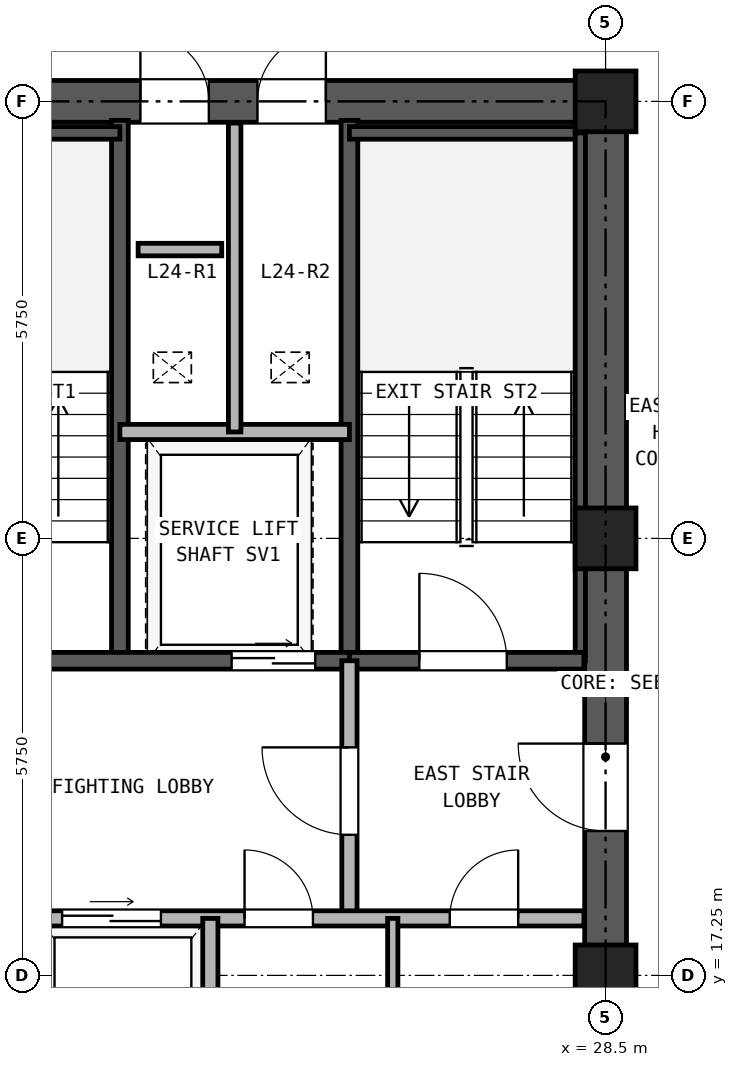
"""IFC4 building model, lengths in metres.
Left out: names, types, materials, properties, quantities, classifications, styles, units other than length and angle.
Written with IfcOpenShell. Run it as: python <this file> out.ifc"""

import sys

from ifc_helpers import new_model, si_unit, direction, frame, frame_2d, origin, origin_2d, place, context, subcontext, project, spatial, rectangle, hollow_rectangle, extrude, source, transform, mapped, element, fill, save


model = new_model("IFC4")
c1 = context("Model", 3, precision=1e-05, world=origin(), true_north=direction((0.0, 1.0)))
c2 = subcontext(c1, "Body", "Model", "MODEL_VIEW")
j1 = project(units=[si_unit("LENGTHUNIT", "METRE"), si_unit("PLANEANGLEUNIT", "RADIAN")], contexts=[c1])
p1 = place(None, origin())
s1 = spatial("IfcSite", under=j1, at=p1, CompositionType="ELEMENT")
p2 = place(p1, origin())
s2 = spatial("IfcBuilding", under=s1, at=p2, CompositionType="ELEMENT")
p3 = place(p2, frame((0.0, 0.0, 92.7)))
s3 = spatial("IfcBuildingStorey", under=s2, at=p3, CompositionType="ELEMENT", Elevation=92.7)
m1 = source(origin(), c2, "Body", "SweptSolid", [
    extrude(hollow_rectangle(XDim=0.8, YDim=0.8, WallThickness=0.045, at=origin_2d()), origin(), (0.0, 0.0, 1.0), 2.95),
])
for number, where, z_axis, x_axis in (
    (1, (28.5, 17.25, 0.0), (0.0, 0.0, 1.0), (1.0, 0.0, 0.0)),
    (2, (28.5, 23.0, 0.0), (0.0, 0.0, 1.0), (1.0, 0.0, 0.0)),
    (3, (28.5, 28.75, 0.0), (0.0, 0.0, 1.0), (1.0, 0.0, 0.0)),
):
    element("IfcColumn", number, at=place(p3, frame(where, z_axis=z_axis, x_axis=x_axis)), inside=s3, PredefinedType="COLUMN", context=c2, shape_type="MappedRepresentation", body=[
        mapped(m1, transform((0.0, 0.0, 0.0), x_axis=(1.0, 0.0, 0.0), y_axis=(0.0, 1.0, 0.0), z_axis=(0.0, 0.0, 1.0), scale=1.0)),
    ])
p4 = place(p3, frame((18.225, 28.75, 0.0), z_axis=(0.0, 0.0, 1.0), x_axis=(1.0, 0.0, 0.0)))
e4 = element("IfcWall", 4, at=p4, inside=s3, PredefinedType="SHEAR", context=c2, shape_type="SweptSolid", body=[
    extrude(rectangle(XDim=10.55, YDim=0.55, at=frame_2d((5.275, 0.0))), origin(), (0.0, 0.0, 1.0), 2.95),
])
p5 = place(p4, frame((4.155, 0.0, 0.0)))
e5 = element("IfcOpeningElement", 5, at=p5, cuts=e4, PredefinedType="OPENING", context=c2, shape_type="SweptSolid", body=[
    extrude(rectangle(XDim=0.9, YDim=2.05, at=frame_2d((0.45, 1.025))), frame((0.0, 0.285, 0.0), z_axis=(0.0, -1.0, 0.0), x_axis=(1.0, 0.0, 0.0)), (0.0, 0.0, 1.0), 0.57),
])
p6 = place(p4, frame((5.695, 0.0, 0.0)))
e6 = element("IfcOpeningElement", 6, at=p6, cuts=e4, PredefinedType="OPENING", context=c2, shape_type="SweptSolid", body=[
    extrude(rectangle(XDim=0.9, YDim=2.05, at=frame_2d((0.45, 1.025))), frame((0.0, 0.285, 0.0), z_axis=(0.0, -1.0, 0.0), x_axis=(1.0, 0.0, 0.0)), (0.0, 0.0, 1.0), 0.57),
])
p7 = place(p3, frame((28.5, 11.775, 0.0), z_axis=(0.0, 0.0, 1.0), x_axis=(0.0, 1.0, 0.0)))
e7 = element("IfcWall", 7, at=p7, inside=s3, PredefinedType="SHEAR", context=c2, shape_type="SweptSolid", body=[
    extrude(rectangle(XDim=16.7, YDim=0.55, at=frame_2d((8.35, 0.0))), origin(), (0.0, 0.0, 1.0), 2.95),
])
p8 = place(p7, frame((7.375, 0.0, 0.0)))
e8 = element("IfcOpeningElement", 8, at=p8, cuts=e7, PredefinedType="OPENING", context=c2, shape_type="SweptSolid", body=[
    extrude(rectangle(XDim=1.15, YDim=2.2, at=frame_2d((0.575, 1.1))), frame((0.0, 0.285, 0.0), z_axis=(0.0, -1.0, 0.0), x_axis=(1.0, 0.0, 0.0)), (0.0, 0.0, 1.0), 0.57),
])
for number, where, z_axis, x_axis in (
    (9, (22.11, 21.39, 0.0), (0.0, 0.0, 1.0), (0.0, 1.0, 0.0)),
    (10, (25.13, 21.39, 0.0), (0.0, 0.0, 1.0), (0.0, 1.0, 0.0)),
):
    element("IfcWall", number, at=place(p3, frame(where, z_axis=z_axis, x_axis=x_axis)), inside=s3, PredefinedType="SOLIDWALL", context=c2, shape_type="SweptSolid", body=[
        extrude(rectangle(XDim=7.11, YDim=0.22, at=frame_2d((3.555, 0.0))), origin(), (0.0, 0.0, 1.0), 2.95),
    ])
p9 = place(p3, frame((18.785, 28.335, 0.0), z_axis=(0.0, 0.0, 1.0), x_axis=(1.0, 0.0, 0.0)))
e11 = element("IfcWall", 11, at=p9, inside=s3, PredefinedType="PARTITIONING", context=c2, shape_type="SweptSolid", body=[
    extrude(rectangle(XDim=3.325, YDim=0.165, at=frame_2d((1.663, 0.0))), origin(), (0.0, 0.0, 1.0), 2.95),
])
p10 = place(p3, frame((25.13, 28.335, 0.0), z_axis=(0.0, 0.0, 1.0), x_axis=(1.0, 0.0, 0.0)))
e12 = element("IfcWall", 12, at=p10, inside=s3, PredefinedType="PARTITIONING", context=c2, shape_type="SweptSolid", body=[
    extrude(rectangle(XDim=3.085, YDim=0.165, at=frame_2d((1.542, 0.0))), origin(), (0.0, 0.0, 1.0), 2.95),
])
p11 = place(p3, frame((28.167, 21.39, 0.0), z_axis=(0.0, 0.0, 1.0), x_axis=(0.0, 1.0, 0.0)))
e13 = element("IfcWall", 13, at=p11, inside=s3, PredefinedType="PARTITIONING", context=c2, shape_type="SweptSolid", body=[
    extrude(rectangle(XDim=6.945, YDim=0.135, at=frame_2d((3.473, 0.0))), origin(), (0.0, 0.0, 1.0), 2.95),
])
p12 = place(p3, frame((18.785, 21.39, 0.0), z_axis=(0.0, 0.0, 1.0), x_axis=(1.0, 0.0, 0.0)))
e14 = element("IfcWall", 14, at=p12, inside=s3, PredefinedType="SOLIDWALL", context=c2, shape_type="SweptSolid", body=[
    extrude(rectangle(XDim=6.345, YDim=0.22, at=frame_2d((3.172, 0.0))), origin(), (0.0, 0.0, 1.0), 2.95),
])
p13 = place(p12, frame((1.065, 0.0, 0.0)))
e15 = element("IfcOpeningElement", 15, at=p13, cuts=e14, PredefinedType="OPENING", context=c2, shape_type="SweptSolid", body=[
    extrude(rectangle(XDim=1.15, YDim=2.2, at=frame_2d((0.575, 1.1))), frame((0.0, 0.12, 0.0), z_axis=(0.0, -1.0, 0.0), x_axis=(1.0, 0.0, 0.0)), (0.0, 0.0, 1.0), 0.24),
])
p14 = place(p12, frame((4.795, 0.0, 0.0)))
e16 = element("IfcOpeningElement", 16, at=p14, cuts=e14, PredefinedType="OPENING", context=c2, shape_type="SweptSolid", body=[
    extrude(rectangle(XDim=1.1, YDim=2.25, at=frame_2d((0.55, 1.125))), frame((0.0, 0.12, 0.0), z_axis=(0.0, -1.0, 0.0), x_axis=(1.0, 0.0, 0.0)), (0.0, 0.0, 1.0), 0.24),
])
p15 = place(p3, frame((25.13, 21.39, 0.0), z_axis=(0.0, 0.0, 1.0), x_axis=(1.0, 0.0, 0.0)))
e17 = element("IfcWall", 17, at=p15, inside=s3, PredefinedType="SOLIDWALL", context=c2, shape_type="SweptSolid", body=[
    extrude(rectangle(XDim=3.085, YDim=0.22, at=frame_2d((1.542, 0.0))), origin(), (0.0, 0.0, 1.0), 2.95),
])
p16 = place(p15, frame((0.92, 0.0, 0.0)))
e18 = element("IfcOpeningElement", 18, at=p16, cuts=e17, PredefinedType="OPENING", context=c2, shape_type="SweptSolid", body=[
    extrude(rectangle(XDim=1.15, YDim=2.2, at=frame_2d((0.575, 1.1))), frame((0.0, 0.12, 0.0), z_axis=(0.0, -1.0, 0.0), x_axis=(1.0, 0.0, 0.0)), (0.0, 0.0, 1.0), 0.24),
])
p17 = place(p3, frame((22.11, 24.4, 0.0), z_axis=(0.0, 0.0, 1.0), x_axis=(1.0, 0.0, 0.0)))
e19 = element("IfcWall", 19, at=p17, inside=s3, PredefinedType="PARTITIONING", context=c2, shape_type="SweptSolid", body=[
    extrude(rectangle(XDim=3.02, YDim=0.2, at=frame_2d((1.51, 0.0))), origin(), (0.0, 0.0, 1.0), 2.95),
])
p18 = place(p3, frame((23.62, 24.4, 0.0), z_axis=(0.0, 0.0, 1.0), x_axis=(0.0, 1.0, 0.0)))
e20 = element("IfcWall", 20, at=p18, inside=s3, PredefinedType="PARTITIONING", context=c2, shape_type="SweptSolid", body=[
    extrude(rectangle(XDim=4.065, YDim=0.165, at=frame_2d((2.033, 0.0))), origin(), (0.0, 0.0, 1.0), 2.95),
])
p19 = place(p3, frame((25.13, 18.0, 0.0), z_axis=(0.0, 0.0, 1.0), x_axis=(0.0, 1.0, 0.0)))
e21 = element("IfcWall", 21, at=p19, inside=s3, PredefinedType="PARTITIONING", context=c2, shape_type="SweptSolid", body=[
    extrude(rectangle(XDim=3.39, YDim=0.2, at=frame_2d((1.695, 0.0))), origin(), (0.0, 0.0, 1.0), 2.95),
])
p20 = place(p19, frame((1.1, 0.0, 0.0)))
e22 = element("IfcOpeningElement", 22, at=p20, cuts=e21, PredefinedType="OPENING", context=c2, shape_type="SweptSolid", body=[
    extrude(rectangle(XDim=1.15, YDim=2.2, at=frame_2d((0.575, 1.1))), frame((0.0, 0.11, 0.0), z_axis=(0.0, -1.0, 0.0), x_axis=(1.0, 0.0, 0.0)), (0.0, 0.0, 1.0), 0.22),
])
p21 = place(p3, frame((18.785, 18.0, 0.0), z_axis=(0.0, 0.0, 1.0), x_axis=(1.0, 0.0, 0.0)))
e23 = element("IfcWall", 23, at=p21, inside=s3, PredefinedType="PARTITIONING", context=c2, shape_type="SweptSolid", body=[
    extrude(rectangle(XDim=9.43, YDim=0.2, at=frame_2d((4.715, 0.0))), origin(), (0.0, 0.0, 1.0), 2.95),
])
p22 = place(p21, frame((0.465, 0.0, 0.0)))
e24 = element("IfcOpeningElement", 24, at=p22, cuts=e23, PredefinedType="OPENING", context=c2, shape_type="SweptSolid", body=[
    extrude(rectangle(XDim=1.3, YDim=2.3, at=frame_2d((0.65, 1.15))), frame((0.0, 0.11, 0.0), z_axis=(0.0, -1.0, 0.0), x_axis=(1.0, 0.0, 0.0)), (0.0, 0.0, 1.0), 0.22),
])
p23 = place(p21, frame((2.565, 0.0, 0.0)))
e25 = element("IfcOpeningElement", 25, at=p23, cuts=e23, PredefinedType="OPENING", context=c2, shape_type="SweptSolid", body=[
    extrude(rectangle(XDim=1.3, YDim=2.3, at=frame_2d((0.65, 1.15))), frame((0.0, 0.11, 0.0), z_axis=(0.0, -1.0, 0.0), x_axis=(1.0, 0.0, 0.0)), (0.0, 0.0, 1.0), 0.22),
])
p24 = place(p21, frame((4.965, 0.0, 0.0)))
e26 = element("IfcOpeningElement", 26, at=p24, cuts=e23, PredefinedType="OPENING", context=c2, shape_type="SweptSolid", body=[
    extrude(rectangle(XDim=0.9, YDim=2.05, at=frame_2d((0.45, 1.025))), frame((0.0, 0.11, 0.0), z_axis=(0.0, -1.0, 0.0), x_axis=(1.0, 0.0, 0.0)), (0.0, 0.0, 1.0), 0.22),
])
p25 = place(p21, frame((7.665, 0.0, 0.0)))
e27 = element("IfcOpeningElement", 27, at=p25, cuts=e23, PredefinedType="OPENING", context=c2, shape_type="SweptSolid", body=[
    extrude(rectangle(XDim=0.9, YDim=2.05, at=frame_2d((0.45, 1.025))), frame((0.0, 0.11, 0.0), z_axis=(0.0, -1.0, 0.0), x_axis=(1.0, 0.0, 0.0)), (0.0, 0.0, 1.0), 0.22),
])
p26 = place(p3, frame((23.3, 15.0, 0.0), z_axis=(0.0, 0.0, 1.0), x_axis=(0.0, 1.0, 0.0)))
e28 = element("IfcWall", 28, at=p26, inside=s3, PredefinedType="PARTITIONING", context=c2, shape_type="SweptSolid", body=[
    extrude(rectangle(XDim=3.0, YDim=0.2, at=frame_2d((1.5, 0.0))), origin(), (0.0, 0.0, 1.0), 2.95),
])
p27 = place(p3, frame((25.7, 15.0, 0.0), z_axis=(0.0, 0.0, 1.0), x_axis=(0.0, 1.0, 0.0)))
e29 = element("IfcWall", 29, at=p27, inside=s3, PredefinedType="PARTITIONING", context=c2, shape_type="SweptSolid", body=[
    extrude(rectangle(XDim=3.0, YDim=0.135, at=frame_2d((1.5, 0.0))), origin(), (0.0, 0.0, 1.0), 2.95),
])
p28 = place(p3, frame((22.35, 26.8, 0.0), z_axis=(0.0, 0.0, 1.0), x_axis=(1.0, 0.0, 0.0)))
e30 = element("IfcWall", 30, at=p28, inside=s3, PredefinedType="PARTITIONING", context=c2, shape_type="SweptSolid", body=[
    extrude(rectangle(XDim=1.1, YDim=0.165, at=frame_2d((0.55, 0.0))), origin(), (0.0, 0.0, 1.0), 2.95),
])
p29 = place(p16, frame((1.15, 0.0, 0.0), z_axis=(0.0, 0.0, 1.0), x_axis=(-1.0, 0.0, 0.0)))
e31 = element("IfcDoor", 31, at=p29, inside=s3, OperationType="SINGLE_SWING_LEFT", PredefinedType="DOOR", context=c2, shape_type="SweptSolid", body=[
    extrude(rectangle(XDim=1.15, YDim=2.2, at=frame_2d((0.575, 1.1))), frame((0.0, 0.025, 0.0), z_axis=(0.0, -1.0, 0.0), x_axis=(1.0, 0.0, 0.0)), (0.0, 0.0, 1.0), 0.05),
])
fill(e18, e31)
p30 = place(p14, frame((1.1, 0.0, 0.0), z_axis=(0.0, 0.0, 1.0), x_axis=(-1.0, 0.0, 0.0)))
e32 = element("IfcDoor", 32, at=p30, inside=s3, OperationType="DOUBLE_DOOR_SLIDING", PredefinedType="DOOR", context=c2, shape_type="SweptSolid", body=[
    extrude(rectangle(XDim=1.1, YDim=2.25, at=frame_2d((0.55, 1.125))), frame((0.0, 0.025, 0.0), z_axis=(0.0, -1.0, 0.0), x_axis=(1.0, 0.0, 0.0)), (0.0, 0.0, 1.0), 0.05),
])
fill(e16, e32)
p31 = place(p20, origin())
e33 = element("IfcDoor", 33, at=p31, inside=s3, OperationType="SINGLE_SWING_RIGHT", PredefinedType="DOOR", context=c2, shape_type="SweptSolid", body=[
    extrude(rectangle(XDim=1.15, YDim=2.2, at=frame_2d((0.575, 1.1))), frame((0.0, 0.025, 0.0), z_axis=(0.0, -1.0, 0.0), x_axis=(1.0, 0.0, 0.0)), (0.0, 0.0, 1.0), 0.05),
])
fill(e22, e33)
p32 = place(p23, origin())
e34 = element("IfcDoor", 34, at=p32, inside=s3, OperationType="DOUBLE_DOOR_SLIDING", PredefinedType="DOOR", context=c2, shape_type="SweptSolid", body=[
    extrude(rectangle(XDim=1.3, YDim=2.3, at=frame_2d((0.65, 1.15))), frame((0.0, 0.025, 0.0), z_axis=(0.0, -1.0, 0.0), x_axis=(1.0, 0.0, 0.0)), (0.0, 0.0, 1.0), 0.05),
])
fill(e25, e34)
p33 = place(p24, frame((0.9, 0.0, 0.0), z_axis=(0.0, 0.0, 1.0), x_axis=(-1.0, 0.0, 0.0)))
e35 = element("IfcDoor", 35, at=p33, inside=s3, OperationType="SINGLE_SWING_LEFT", PredefinedType="DOOR", context=c2, shape_type="SweptSolid", body=[
    extrude(rectangle(XDim=0.9, YDim=2.05, at=frame_2d((0.45, 1.025))), frame((0.0, 0.025, 0.0), z_axis=(0.0, -1.0, 0.0), x_axis=(1.0, 0.0, 0.0)), (0.0, 0.0, 1.0), 0.05),
])
fill(e26, e35)
p34 = place(p25, frame((0.9, 0.0, 0.0), z_axis=(0.0, 0.0, 1.0), x_axis=(-1.0, 0.0, 0.0)))
e36 = element("IfcDoor", 36, at=p34, inside=s3, OperationType="SINGLE_SWING_RIGHT", PredefinedType="DOOR", context=c2, shape_type="SweptSolid", body=[
    extrude(rectangle(XDim=0.9, YDim=2.05, at=frame_2d((0.45, 1.025))), frame((0.0, 0.025, 0.0), z_axis=(0.0, -1.0, 0.0), x_axis=(1.0, 0.0, 0.0)), (0.0, 0.0, 1.0), 0.05),
])
fill(e27, e36)
p35 = place(p8, origin())
e37 = element("IfcDoor", 37, at=p35, inside=s3, OperationType="SINGLE_SWING_RIGHT", PredefinedType="DOOR", context=c2, shape_type="SweptSolid", body=[
    extrude(rectangle(XDim=1.15, YDim=2.2, at=frame_2d((0.575, 1.1))), frame((0.0, 0.025, 0.0), z_axis=(0.0, -1.0, 0.0), x_axis=(1.0, 0.0, 0.0)), (0.0, 0.0, 1.0), 0.05),
])
fill(e8, e37)
p36 = place(p5, origin())
e38 = element("IfcDoor", 38, at=p36, inside=s3, OperationType="SINGLE_SWING_LEFT", PredefinedType="DOOR", context=c2, shape_type="SweptSolid", body=[
    extrude(rectangle(XDim=0.9, YDim=2.05, at=frame_2d((0.45, 1.025))), frame((0.0, 0.025, 0.0), z_axis=(0.0, -1.0, 0.0), x_axis=(1.0, 0.0, 0.0)), (0.0, 0.0, 1.0), 0.05),
])
fill(e5, e38)
p37 = place(p6, origin())
e39 = element("IfcDoor", 39, at=p37, inside=s3, OperationType="SINGLE_SWING_RIGHT", PredefinedType="DOOR", context=c2, shape_type="SweptSolid", body=[
    extrude(rectangle(XDim=0.9, YDim=2.05, at=frame_2d((0.45, 1.025))), frame((0.0, 0.025, 0.0), z_axis=(0.0, -1.0, 0.0), x_axis=(1.0, 0.0, 0.0)), (0.0, 0.0, 1.0), 0.05),
])
fill(e6, e39)
save(model, sys.argv[1])
